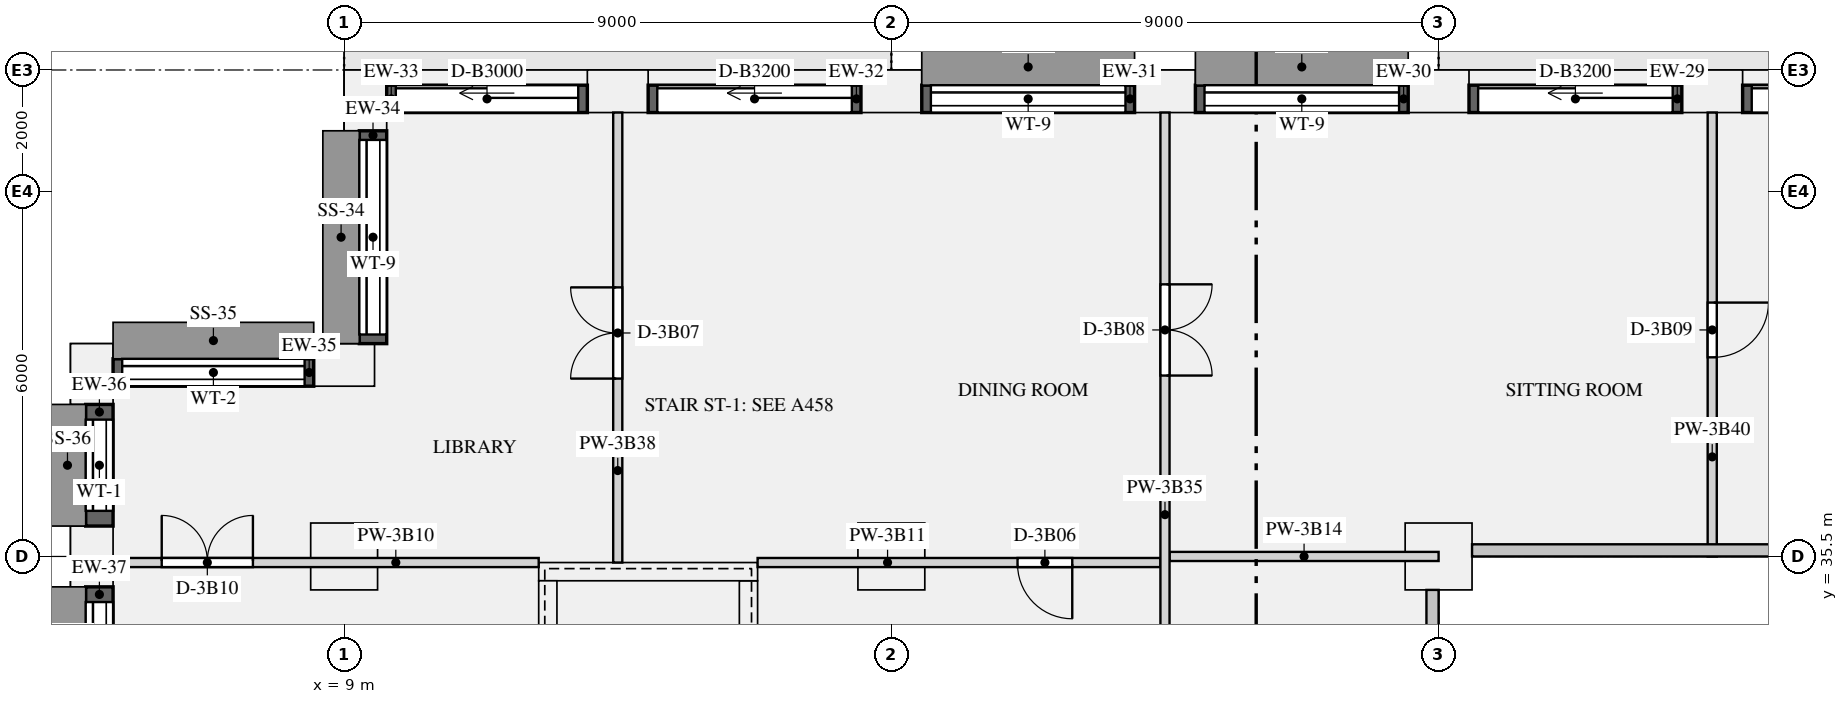
"""IFC4 building model, lengths in metres.
Left out: names, types, materials, properties, quantities, classifications, styles, units other than length and angle.
Written with IfcOpenShell. Run it as: python <this file> out.ifc"""

import sys

from ifc_helpers import new_model, si_unit, direction, frame, frame_2d, origin, origin_2d, place, context, subcontext, project, spatial, rectangle, extrude, element, fill, save


model = new_model("IFC4")
c1 = context("Model", 3, precision=1e-05, world=origin(), true_north=direction((0.0, 1.0)))
c2 = subcontext(c1, "Body", "Model", "MODEL_VIEW")
j1 = project(units=[si_unit("LENGTHUNIT", "METRE"), si_unit("PLANEANGLEUNIT", "RADIAN")], contexts=[c1])
p1 = place(None, origin())
s1 = spatial("IfcSite", under=j1, at=p1, CompositionType="ELEMENT")
p2 = place(p1, origin())
s2 = spatial("IfcBuilding", under=s1, at=p2, CompositionType="ELEMENT")
p3 = place(p2, frame((0.0, 0.0, 150.75)))
s3 = spatial("IfcBuildingStorey", under=s2, at=p3, CompositionType="ELEMENT", Elevation=150.75)
for number, where, z_axis, x_axis in (
    (1, (31.5, 43.15, 0.0), (0.0, 0.0, 1.0), (-1.0, 0.0, 0.0)),
    (2, (27.0, 43.15, 0.0), (0.0, 0.0, 1.0), (-1.0, 0.0, 0.0)),
    (3, (22.5, 43.15, 0.0), (0.0, 0.0, 1.0), (-1.0, 0.0, 0.0)),
    (4, (18.0, 43.15, 0.0), (0.0, 0.0, 1.0), (-1.0, 0.0, 0.0)),
    (5, (13.5, 43.15, 0.0), (0.0, 0.0, 1.0), (-1.0, 0.0, 0.0)),
    (6, (9.35, 43.0, 0.0), (0.0, 0.0, 1.0), (0.0, -1.0, 0.0)),
    (7, (9.0, 38.65, 0.0), (0.0, 0.0, 1.0), (-1.0, 0.0, 0.0)),
    (8, (4.85, 38.5, 0.0), (0.0, 0.0, 1.0), (0.0, -1.0, 0.0)),
    (9, (4.85, 35.5, 0.0), (0.0, 0.0, 1.0), (0.0, -1.0, 0.0)),
):
    element("IfcColumn", number, at=place(p3, frame(where, z_axis=z_axis, x_axis=x_axis)), inside=s3, PredefinedType="USERDEFINED", context=c2, shape_type="SweptSolid", body=[
        extrude(rectangle(XDim=1.0, YDim=0.7, at=origin_2d()), origin(), (0.0, 0.0, 1.0), 3.15),
    ])
for number, where, z_axis, x_axis in (
    (10, (9.0, 35.5, 0.0), (0.0, 0.0, 1.0), (1.0, 0.0, 0.0)),
    (11, (18.0, 35.5, 0.0), (0.0, 0.0, 1.0), (1.0, 0.0, 0.0)),
    (12, (27.0, 35.5, 0.0), (0.0, 0.0, 1.0), (1.0, 0.0, 0.0)),
):
    element("IfcColumn", number, at=place(p3, frame(where, z_axis=z_axis, x_axis=x_axis)), inside=s3, PredefinedType="COLUMN", context=c2, shape_type="SweptSolid", body=[
        extrude(rectangle(XDim=1.1, YDim=1.1, at=origin_2d()), origin(), (0.0, 0.0, 1.0), 3.15),
    ])
p4 = place(p3, frame((12.2, 35.25, 0.0), z_axis=(0.0, 0.0, 1.0), x_axis=(1.0, 0.0, 0.0)))
e13 = element("IfcWall", 13, at=p4, inside=s3, PredefinedType="SHEAR", context=c2, shape_type="SweptSolid", body=[
    extrude(rectangle(XDim=3.6, YDim=0.3, at=frame_2d((1.8, 0.0))), origin(), (0.0, 0.0, 1.0), 3.15),
])
for number, where, z_axis, x_axis in (
    (14, (12.35, 27.3, 0.0), (0.0, 0.0, 1.0), (0.0, 1.0, 0.0)),
    (15, (15.65, 27.3, 0.0), (0.0, 0.0, 1.0), (0.0, 1.0, 0.0)),
):
    element("IfcWall", number, at=place(p3, frame(where, z_axis=z_axis, x_axis=x_axis)), inside=s3, PredefinedType="SHEAR", context=c2, shape_type="SweptSolid", body=[
        extrude(rectangle(XDim=7.8, YDim=0.3, at=frame_2d((3.9, 0.0))), origin(), (0.0, 0.0, 1.0), 3.15),
    ])
p5 = place(p3, frame((35.5, 43.025, 0.0), z_axis=(0.0, 0.0, 1.0), x_axis=(-1.0, 0.0, 0.0)))
e16 = element("IfcWall", 16, at=p5, inside=s3, PredefinedType="SOLIDWALL", context=c2, shape_type="SweptSolid", body=[
    extrude(rectangle(XDim=3.5, YDim=0.45, at=frame_2d((1.75, 0.0))), origin(), (0.0, 0.0, 1.0), 2.83),
])
p6 = place(p5, frame((0.15, 0.0, 0.0)))
e17 = element("IfcOpeningElement", 17, at=p6, cuts=e16, PredefinedType="OPENING", context=c2, shape_type="SweptSolid", body=[
    extrude(rectangle(XDim=3.2, YDim=2.3, at=frame_2d((1.6, 1.15))), frame((0.0, 0.235, 0.0), z_axis=(0.0, -1.0, 0.0), x_axis=(1.0, 0.0, 0.0)), (0.0, 0.0, 1.0), 0.47),
])
p7 = place(p3, frame((31.0, 43.025, 0.0), z_axis=(0.0, 0.0, 1.0), x_axis=(-1.0, 0.0, 0.0)))
e18 = element("IfcWall", 18, at=p7, inside=s3, PredefinedType="SOLIDWALL", context=c2, shape_type="SweptSolid", body=[
    extrude(rectangle(XDim=3.5, YDim=0.45, at=frame_2d((1.75, 0.0))), origin(), (0.0, 0.0, 1.0), 2.83),
])
p8 = place(p7, frame((0.15, 0.0, 0.0)))
e19 = element("IfcOpeningElement", 19, at=p8, cuts=e18, PredefinedType="OPENING", context=c2, shape_type="SweptSolid", body=[
    extrude(rectangle(XDim=3.2, YDim=2.3, at=frame_2d((1.6, 1.15))), frame((0.0, 0.235, 0.0), z_axis=(0.0, -1.0, 0.0), x_axis=(1.0, 0.0, 0.0)), (0.0, 0.0, 1.0), 0.47),
])
p9 = place(p3, frame((26.5, 43.025, 0.9), z_axis=(0.0, 0.0, 1.0), x_axis=(-1.0, 0.0, 0.0)))
e20 = element("IfcWall", 20, at=p9, inside=s3, PredefinedType="SOLIDWALL", context=c2, shape_type="SweptSolid", body=[
    extrude(rectangle(XDim=3.5, YDim=0.45, at=frame_2d((1.75, 0.0))), origin(), (0.0, 0.0, 1.0), 1.93),
])
p10 = place(p9, frame((0.15, 0.0, 0.15)))
e21 = element("IfcOpeningElement", 21, at=p10, cuts=e20, PredefinedType="OPENING", context=c2, shape_type="SweptSolid", body=[
    extrude(rectangle(XDim=3.2, YDim=1.5, at=frame_2d((1.6, 0.75))), frame((0.0, 0.235, 0.0), z_axis=(0.0, -1.0, 0.0), x_axis=(1.0, 0.0, 0.0)), (0.0, 0.0, 1.0), 0.47),
])
p11 = place(p3, frame((22.0, 43.025, 0.9), z_axis=(0.0, 0.0, 1.0), x_axis=(-1.0, 0.0, 0.0)))
e22 = element("IfcWall", 22, at=p11, inside=s3, PredefinedType="SOLIDWALL", context=c2, shape_type="SweptSolid", body=[
    extrude(rectangle(XDim=3.5, YDim=0.45, at=frame_2d((1.75, 0.0))), origin(), (0.0, 0.0, 1.0), 1.93),
])
p12 = place(p11, frame((0.15, 0.0, 0.15)))
e23 = element("IfcOpeningElement", 23, at=p12, cuts=e22, PredefinedType="OPENING", context=c2, shape_type="SweptSolid", body=[
    extrude(rectangle(XDim=3.2, YDim=1.5, at=frame_2d((1.6, 0.75))), frame((0.0, 0.235, 0.0), z_axis=(0.0, -1.0, 0.0), x_axis=(1.0, 0.0, 0.0)), (0.0, 0.0, 1.0), 0.47),
])
p13 = place(p3, frame((17.5, 43.025, 0.0), z_axis=(0.0, 0.0, 1.0), x_axis=(-1.0, 0.0, 0.0)))
e24 = element("IfcWall", 24, at=p13, inside=s3, PredefinedType="SOLIDWALL", context=c2, shape_type="SweptSolid", body=[
    extrude(rectangle(XDim=3.5, YDim=0.45, at=frame_2d((1.75, 0.0))), origin(), (0.0, 0.0, 1.0), 2.83),
])
p14 = place(p13, frame((0.15, 0.0, 0.0)))
e25 = element("IfcOpeningElement", 25, at=p14, cuts=e24, PredefinedType="OPENING", context=c2, shape_type="SweptSolid", body=[
    extrude(rectangle(XDim=3.2, YDim=2.3, at=frame_2d((1.6, 1.15))), frame((0.0, 0.235, 0.0), z_axis=(0.0, -1.0, 0.0), x_axis=(1.0, 0.0, 0.0)), (0.0, 0.0, 1.0), 0.47),
])
p15 = place(p3, frame((13.0, 43.025, 0.0), z_axis=(0.0, 0.0, 1.0), x_axis=(-1.0, 0.0, 0.0)))
e26 = element("IfcWall", 26, at=p15, inside=s3, PredefinedType="SOLIDWALL", context=c2, shape_type="SweptSolid", body=[
    extrude(rectangle(XDim=3.3, YDim=0.45, at=frame_2d((1.65, 0.0))), origin(), (0.0, 0.0, 1.0), 2.83),
])
p16 = place(p15, frame((0.15, 0.0, 0.0)))
e27 = element("IfcOpeningElement", 27, at=p16, cuts=e26, PredefinedType="OPENING", context=c2, shape_type="SweptSolid", body=[
    extrude(rectangle(XDim=3.0, YDim=2.3, at=frame_2d((1.5, 1.15))), frame((0.0, 0.235, 0.0), z_axis=(0.0, -1.0, 0.0), x_axis=(1.0, 0.0, 0.0)), (0.0, 0.0, 1.0), 0.47),
])
p17 = place(p3, frame((9.475, 42.5, 0.9), z_axis=(0.0, 0.0, 1.0), x_axis=(0.0, -1.0, 0.0)))
e28 = element("IfcWall", 28, at=p17, inside=s3, PredefinedType="SOLIDWALL", context=c2, shape_type="SweptSolid", body=[
    extrude(rectangle(XDim=3.5, YDim=0.45, at=frame_2d((1.75, 0.0))), origin(), (0.0, 0.0, 1.0), 1.93),
])
p18 = place(p17, frame((0.15, 0.0, 0.15)))
e29 = element("IfcOpeningElement", 29, at=p18, cuts=e28, PredefinedType="OPENING", context=c2, shape_type="SweptSolid", body=[
    extrude(rectangle(XDim=3.2, YDim=1.5, at=frame_2d((1.6, 0.75))), frame((0.0, 0.235, 0.0), z_axis=(0.0, -1.0, 0.0), x_axis=(1.0, 0.0, 0.0)), (0.0, 0.0, 1.0), 0.47),
])
p19 = place(p3, frame((8.5, 38.525, 0.9), z_axis=(0.0, 0.0, 1.0), x_axis=(-1.0, 0.0, 0.0)))
e30 = element("IfcWall", 30, at=p19, inside=s3, PredefinedType="SOLIDWALL", context=c2, shape_type="SweptSolid", body=[
    extrude(rectangle(XDim=3.3, YDim=0.45, at=frame_2d((1.65, 0.0))), origin(), (0.0, 0.0, 1.0), 1.93),
])
p20 = place(p19, frame((0.15, 0.0, 0.15)))
e31 = element("IfcOpeningElement", 31, at=p20, cuts=e30, PredefinedType="OPENING", context=c2, shape_type="SweptSolid", body=[
    extrude(rectangle(XDim=3.0, YDim=1.5, at=frame_2d((1.5, 0.75))), frame((0.0, 0.235, 0.0), z_axis=(0.0, -1.0, 0.0), x_axis=(1.0, 0.0, 0.0)), (0.0, 0.0, 1.0), 0.47),
])
p21 = place(p3, frame((4.975, 38.0, 0.9), z_axis=(0.0, 0.0, 1.0), x_axis=(0.0, -1.0, 0.0)))
e32 = element("IfcWall", 32, at=p21, inside=s3, PredefinedType="SOLIDWALL", context=c2, shape_type="SweptSolid", body=[
    extrude(rectangle(XDim=2.0, YDim=0.45, at=frame_2d((1.0, 0.0))), origin(), (0.0, 0.0, 1.0), 1.93),
])
p22 = place(p21, frame((0.25, 0.0, 0.15)))
e33 = element("IfcOpeningElement", 33, at=p22, cuts=e32, PredefinedType="OPENING", context=c2, shape_type="SweptSolid", body=[
    extrude(rectangle(XDim=1.5, YDim=1.5, at=frame_2d((0.75, 0.75))), frame((0.0, 0.235, 0.0), z_axis=(0.0, -1.0, 0.0), x_axis=(1.0, 0.0, 0.0)), (0.0, 0.0, 1.0), 0.47),
])
p23 = place(p3, frame((4.975, 35.0, 0.9), z_axis=(0.0, 0.0, 1.0), x_axis=(0.0, -1.0, 0.0)))
e34 = element("IfcWall", 34, at=p23, inside=s3, PredefinedType="SOLIDWALL", context=c2, shape_type="SweptSolid", body=[
    extrude(rectangle(XDim=2.5, YDim=0.45, at=frame_2d((1.25, 0.0))), origin(), (0.0, 0.0, 1.0), 1.93),
])
p24 = place(p23, frame((0.25, 0.0, 0.15)))
e35 = element("IfcOpeningElement", 35, at=p24, cuts=e34, PredefinedType="OPENING", context=c2, shape_type="SweptSolid", body=[
    extrude(rectangle(XDim=2.0, YDim=1.5, at=frame_2d((1.0, 0.75))), frame((0.0, 0.235, 0.0), z_axis=(0.0, -1.0, 0.0), x_axis=(1.0, 0.0, 0.0)), (0.0, 0.0, 1.0), 0.47),
])
p25 = place(p3, frame((5.2, 35.4, 0.0), z_axis=(0.0, 0.0, 1.0), x_axis=(1.0, 0.0, 0.0)))
e36 = element("IfcWall", 36, at=p25, inside=s3, PredefinedType="PARTITIONING", context=c2, shape_type="SweptSolid", body=[
    extrude(rectangle(XDim=7.0, YDim=0.15, at=frame_2d((3.5, 0.0))), origin(), (0.0, 0.0, 1.0), 2.83),
])
p26 = place(p25, frame((0.8, 0.0, 0.0)))
e37 = element("IfcOpeningElement", 37, at=p26, cuts=e36, PredefinedType="OPENING", context=c2, shape_type="SweptSolid", body=[
    extrude(rectangle(XDim=1.5, YDim=2.1, at=frame_2d((0.75, 1.05))), frame((0.0, 0.085, 0.0), z_axis=(0.0, -1.0, 0.0), x_axis=(1.0, 0.0, 0.0)), (0.0, 0.0, 1.0), 0.17),
])
p27 = place(p3, frame((15.8, 35.4, 0.0), z_axis=(0.0, 0.0, 1.0), x_axis=(1.0, 0.0, 0.0)))
e38 = element("IfcWall", 38, at=p27, inside=s3, PredefinedType="PARTITIONING", context=c2, shape_type="SweptSolid", body=[
    extrude(rectangle(XDim=6.625, YDim=0.15, at=frame_2d((3.312, 0.0))), origin(), (0.0, 0.0, 1.0), 2.83),
])
p28 = place(p27, frame((4.275, 0.0, 0.0)))
e39 = element("IfcOpeningElement", 39, at=p28, cuts=e38, PredefinedType="OPENING", context=c2, shape_type="SweptSolid", body=[
    extrude(rectangle(XDim=0.9, YDim=2.1, at=frame_2d((0.45, 1.05))), frame((0.0, 0.085, 0.0), z_axis=(0.0, -1.0, 0.0), x_axis=(1.0, 0.0, 0.0)), (0.0, 0.0, 1.0), 0.17),
])
p29 = place(p3, frame((22.575, 35.5, 0.0), z_axis=(0.0, 0.0, 1.0), x_axis=(1.0, 0.0, 0.0)))
e40 = element("IfcWall", 40, at=p29, inside=s3, PredefinedType="PARTITIONING", context=c2, shape_type="SweptSolid", body=[
    extrude(rectangle(XDim=4.425, YDim=0.15, at=frame_2d((2.212, 0.0))), origin(), (0.0, 0.0, 1.0), 2.83),
])
p30 = place(p3, frame((22.5, 31.575, 0.0), z_axis=(0.0, 0.0, 1.0), x_axis=(0.0, 1.0, 0.0)))
e41 = element("IfcWall", 41, at=p30, inside=s3, PredefinedType="PARTITIONING", context=c2, shape_type="SweptSolid", body=[
    extrude(rectangle(XDim=11.225, YDim=0.15, at=frame_2d((5.613, 0.0))), origin(), (0.0, 0.0, 1.0), 2.83),
])
p31 = place(p30, frame((1.425, 0.0, 0.0)))
e42 = element("IfcOpeningElement", 42, at=p31, cuts=e41, PredefinedType="OPENING", context=c2, shape_type="SweptSolid", body=[
    extrude(rectangle(XDim=0.9, YDim=2.1, at=frame_2d((0.45, 1.05))), frame((0.0, 0.085, 0.0), z_axis=(0.0, -1.0, 0.0), x_axis=(1.0, 0.0, 0.0)), (0.0, 0.0, 1.0), 0.17),
])
p32 = place(p30, frame((6.9, 0.0, 0.0)))
e43 = element("IfcOpeningElement", 43, at=p32, cuts=e41, PredefinedType="OPENING", context=c2, shape_type="SweptSolid", body=[
    extrude(rectangle(XDim=1.5, YDim=2.1, at=frame_2d((0.75, 1.05))), frame((0.0, 0.085, 0.0), z_axis=(0.0, -1.0, 0.0), x_axis=(1.0, 0.0, 0.0)), (0.0, 0.0, 1.0), 0.17),
])
p33 = place(p3, frame((13.5, 35.4, 0.0), z_axis=(0.0, 0.0, 1.0), x_axis=(0.0, 1.0, 0.0)))
e44 = element("IfcWall", 44, at=p33, inside=s3, PredefinedType="PARTITIONING", context=c2, shape_type="SweptSolid", body=[
    extrude(rectangle(XDim=7.4, YDim=0.15, at=frame_2d((3.7, 0.0))), origin(), (0.0, 0.0, 1.0), 2.83),
])
p34 = place(p33, frame((3.025, 0.0, 0.0)))
e45 = element("IfcOpeningElement", 45, at=p34, cuts=e44, PredefinedType="OPENING", context=c2, shape_type="SweptSolid", body=[
    extrude(rectangle(XDim=1.5, YDim=2.1, at=frame_2d((0.75, 1.05))), frame((0.0, 0.085, 0.0), z_axis=(0.0, -1.0, 0.0), x_axis=(1.0, 0.0, 0.0)), (0.0, 0.0, 1.0), 0.17),
])
p35 = place(p3, frame((31.5, 35.5, 0.0), z_axis=(0.0, 0.0, 1.0), x_axis=(0.0, 1.0, 0.0)))
e46 = element("IfcWall", 46, at=p35, inside=s3, PredefinedType="PARTITIONING", context=c2, shape_type="SweptSolid", body=[
    extrude(rectangle(XDim=7.3, YDim=0.15, at=frame_2d((3.65, 0.0))), origin(), (0.0, 0.0, 1.0), 2.83),
])
p36 = place(p35, frame((3.275, 0.0, 0.0)))
e47 = element("IfcOpeningElement", 47, at=p36, cuts=e46, PredefinedType="OPENING", context=c2, shape_type="SweptSolid", body=[
    extrude(rectangle(XDim=0.9, YDim=2.1, at=frame_2d((0.45, 1.05))), frame((0.0, 0.085, 0.0), z_axis=(0.0, -1.0, 0.0), x_axis=(1.0, 0.0, 0.0)), (0.0, 0.0, 1.0), 0.17),
])
p37 = place(p6, origin())
e48 = element("IfcDoor", 48, at=p37, inside=s3, OperationType="SLIDING_TO_LEFT", PredefinedType="DOOR", context=c2, shape_type="SweptSolid", body=[
    extrude(rectangle(XDim=3.2, YDim=2.3, at=frame_2d((1.6, 1.15))), frame((0.0, -0.07, 0.0), z_axis=(0.0, -1.0, 0.0), x_axis=(1.0, 0.0, 0.0)), (0.0, 0.0, 1.0), 0.05),
])
fill(e17, e48)
p38 = place(p8, origin())
e49 = element("IfcDoor", 49, at=p38, inside=s3, OperationType="SLIDING_TO_LEFT", PredefinedType="DOOR", context=c2, shape_type="SweptSolid", body=[
    extrude(rectangle(XDim=3.2, YDim=2.3, at=frame_2d((1.6, 1.15))), frame((0.0, -0.07, 0.0), z_axis=(0.0, -1.0, 0.0), x_axis=(1.0, 0.0, 0.0)), (0.0, 0.0, 1.0), 0.05),
])
fill(e19, e49)
p39 = place(p10, origin())
e50 = element("IfcWindow", 50, at=p39, inside=s3, PartitioningType="SINGLE_PANEL", PredefinedType="WINDOW", context=c2, shape_type="SweptSolid", body=[
    extrude(rectangle(XDim=3.2, YDim=1.5, at=frame_2d((1.6, 0.75))), frame((0.0, -0.065, 0.0), z_axis=(0.0, -1.0, 0.0), x_axis=(1.0, 0.0, 0.0)), (0.0, 0.0, 1.0), 0.06),
])
fill(e21, e50)
p40 = place(p12, origin())
e51 = element("IfcWindow", 51, at=p40, inside=s3, PartitioningType="SINGLE_PANEL", PredefinedType="WINDOW", context=c2, shape_type="SweptSolid", body=[
    extrude(rectangle(XDim=3.2, YDim=1.5, at=frame_2d((1.6, 0.75))), frame((0.0, -0.065, 0.0), z_axis=(0.0, -1.0, 0.0), x_axis=(1.0, 0.0, 0.0)), (0.0, 0.0, 1.0), 0.06),
])
fill(e23, e51)
p41 = place(p14, origin())
e52 = element("IfcDoor", 52, at=p41, inside=s3, OperationType="SLIDING_TO_LEFT", PredefinedType="DOOR", context=c2, shape_type="SweptSolid", body=[
    extrude(rectangle(XDim=3.2, YDim=2.3, at=frame_2d((1.6, 1.15))), frame((0.0, -0.07, 0.0), z_axis=(0.0, -1.0, 0.0), x_axis=(1.0, 0.0, 0.0)), (0.0, 0.0, 1.0), 0.05),
])
fill(e25, e52)
p42 = place(p16, origin())
e53 = element("IfcDoor", 53, at=p42, inside=s3, OperationType="SLIDING_TO_LEFT", PredefinedType="DOOR", context=c2, shape_type="SweptSolid", body=[
    extrude(rectangle(XDim=3.0, YDim=2.3, at=frame_2d((1.5, 1.15))), frame((0.0, -0.07, 0.0), z_axis=(0.0, -1.0, 0.0), x_axis=(1.0, 0.0, 0.0)), (0.0, 0.0, 1.0), 0.05),
])
fill(e27, e53)
p43 = place(p18, origin())
e54 = element("IfcWindow", 54, at=p43, inside=s3, PartitioningType="SINGLE_PANEL", PredefinedType="WINDOW", context=c2, shape_type="SweptSolid", body=[
    extrude(rectangle(XDim=3.2, YDim=1.5, at=frame_2d((1.6, 0.75))), frame((0.0, -0.065, 0.0), z_axis=(0.0, -1.0, 0.0), x_axis=(1.0, 0.0, 0.0)), (0.0, 0.0, 1.0), 0.06),
])
fill(e29, e54)
p44 = place(p20, origin())
e55 = element("IfcWindow", 55, at=p44, inside=s3, PartitioningType="SINGLE_PANEL", PredefinedType="WINDOW", context=c2, shape_type="SweptSolid", body=[
    extrude(rectangle(XDim=3.0, YDim=1.5, at=frame_2d((1.5, 0.75))), frame((0.0, -0.065, 0.0), z_axis=(0.0, -1.0, 0.0), x_axis=(1.0, 0.0, 0.0)), (0.0, 0.0, 1.0), 0.06),
])
fill(e31, e55)
p45 = place(p22, origin())
e56 = element("IfcWindow", 56, at=p45, inside=s3, PartitioningType="SINGLE_PANEL", PredefinedType="WINDOW", context=c2, shape_type="SweptSolid", body=[
    extrude(rectangle(XDim=1.5, YDim=1.5, at=frame_2d((0.75, 0.75))), frame((0.0, -0.065, 0.0), z_axis=(0.0, -1.0, 0.0), x_axis=(1.0, 0.0, 0.0)), (0.0, 0.0, 1.0), 0.06),
])
fill(e33, e56)
p46 = place(p24, origin())
e57 = element("IfcWindow", 57, at=p46, inside=s3, PartitioningType="SINGLE_PANEL", PredefinedType="WINDOW", context=c2, shape_type="SweptSolid", body=[
    extrude(rectangle(XDim=2.0, YDim=1.5, at=frame_2d((1.0, 0.75))), frame((0.0, -0.065, 0.0), z_axis=(0.0, -1.0, 0.0), x_axis=(1.0, 0.0, 0.0)), (0.0, 0.0, 1.0), 0.06),
])
fill(e35, e57)
p47 = place(p28, frame((0.9, 0.0, 0.0), z_axis=(0.0, 0.0, 1.0), x_axis=(-1.0, 0.0, 0.0)))
e58 = element("IfcDoor", 58, at=p47, inside=s3, OperationType="SINGLE_SWING_LEFT", PredefinedType="DOOR", context=c2, shape_type="SweptSolid", body=[
    extrude(rectangle(XDim=0.9, YDim=2.1, at=frame_2d((0.45, 1.05))), frame((0.0, 0.025, 0.0), z_axis=(0.0, -1.0, 0.0), x_axis=(1.0, 0.0, 0.0)), (0.0, 0.0, 1.0), 0.05),
])
fill(e39, e58)
p48 = place(p34, origin())
e59 = element("IfcDoor", 59, at=p48, inside=s3, OperationType="DOUBLE_DOOR_SINGLE_SWING", PredefinedType="DOOR", context=c2, shape_type="SweptSolid", body=[
    extrude(rectangle(XDim=1.5, YDim=2.1, at=frame_2d((0.75, 1.05))), frame((0.0, 0.025, 0.0), z_axis=(0.0, -1.0, 0.0), x_axis=(1.0, 0.0, 0.0)), (0.0, 0.0, 1.0), 0.05),
])
fill(e45, e59)
p49 = place(p32, frame((1.5, 0.0, 0.0), z_axis=(0.0, 0.0, 1.0), x_axis=(-1.0, 0.0, 0.0)))
e60 = element("IfcDoor", 60, at=p49, inside=s3, OperationType="DOUBLE_DOOR_SINGLE_SWING", PredefinedType="DOOR", context=c2, shape_type="SweptSolid", body=[
    extrude(rectangle(XDim=1.5, YDim=2.1, at=frame_2d((0.75, 1.05))), frame((0.0, 0.025, 0.0), z_axis=(0.0, -1.0, 0.0), x_axis=(1.0, 0.0, 0.0)), (0.0, 0.0, 1.0), 0.05),
])
fill(e43, e60)
p50 = place(p36, frame((0.9, 0.0, 0.0), z_axis=(0.0, 0.0, 1.0), x_axis=(-1.0, 0.0, 0.0)))
e61 = element("IfcDoor", 61, at=p50, inside=s3, OperationType="SINGLE_SWING_LEFT", PredefinedType="DOOR", context=c2, shape_type="SweptSolid", body=[
    extrude(rectangle(XDim=0.9, YDim=2.1, at=frame_2d((0.45, 1.05))), frame((0.0, 0.025, 0.0), z_axis=(0.0, -1.0, 0.0), x_axis=(1.0, 0.0, 0.0)), (0.0, 0.0, 1.0), 0.05),
])
fill(e47, e61)
p51 = place(p26, origin())
e62 = element("IfcDoor", 62, at=p51, inside=s3, OperationType="DOUBLE_DOOR_SINGLE_SWING", PredefinedType="DOOR", context=c2, shape_type="SweptSolid", body=[
    extrude(rectangle(XDim=1.5, YDim=2.1, at=frame_2d((0.75, 1.05))), frame((0.0, 0.025, 0.0), z_axis=(0.0, -1.0, 0.0), x_axis=(1.0, 0.0, 0.0)), (0.0, 0.0, 1.0), 0.05),
])
fill(e37, e62)
save(model, sys.argv[1])
